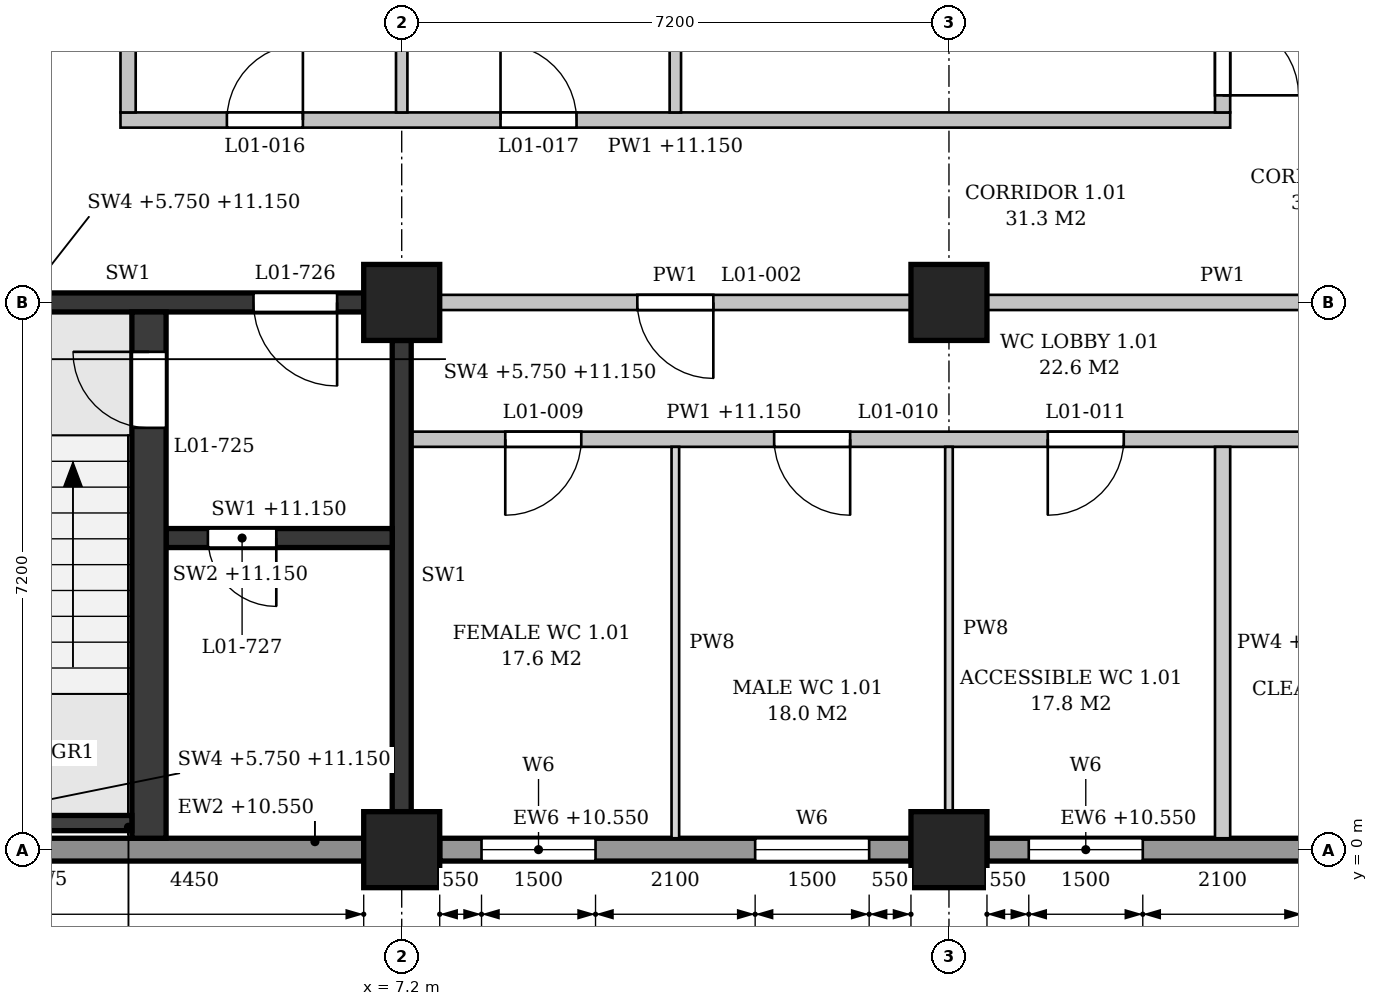
"""IFC4 building model, lengths in metres.
Left out: names, types, materials, properties, quantities, classifications, styles, units other than length and angle.
Written with IfcOpenShell. Run it as: python <this file> out.ifc"""

import sys

from ifc_helpers import new_model, si_unit, direction, frame, frame_2d, origin, origin_2d, place, context, subcontext, project, spatial, polyline, rectangle, outline, extrude, element, fill, save


model = new_model("IFC4")
c1 = context("Model", 3, precision=1e-05, world=origin(), true_north=direction((0.0, 1.0)))
c2 = subcontext(c1, "Body", "Model", "MODEL_VIEW")
j1 = project(units=[si_unit("LENGTHUNIT", "METRE"), si_unit("PLANEANGLEUNIT", "RADIAN")], contexts=[c1])
p1 = place(None, origin())
s1 = spatial("IfcSite", under=j1, at=p1, CompositionType="ELEMENT")
p2 = place(p1, origin())
s2 = spatial("IfcBuilding", under=s1, at=p2, CompositionType="ELEMENT")
p3 = place(p2, frame((0.0, 0.0, 6.0)))
s3 = spatial("IfcBuildingStorey", under=s2, at=p3, CompositionType="ELEMENT", Elevation=6.0)
for number, where, z_axis, x_axis in (
    (1, (7.2, 0.0, 0.0), (0.0, 0.0, 1.0), (1.0, 0.0, 0.0)),
    (2, (7.2, 7.2, 0.0), (0.0, 0.0, 1.0), (1.0, 0.0, 0.0)),
    (3, (14.4, 0.0, 0.0), (0.0, 0.0, 1.0), (1.0, 0.0, 0.0)),
    (4, (14.4, 7.2, 0.0), (0.0, 0.0, 1.0), (1.0, 0.0, 0.0)),
):
    element("IfcColumn", number, at=place(p3, frame(where, z_axis=z_axis, x_axis=x_axis)), inside=s3, PredefinedType="COLUMN", context=c2, shape_type="SweptSolid", body=[
        extrude(rectangle(XDim=1.0, YDim=1.0, at=origin_2d()), origin(), (0.0, 0.0, 1.0), 5.4),
    ])
p4 = place(p3, frame((0.5, 0.0, 0.0), z_axis=(0.0, 0.0, 1.0), x_axis=(1.0, 0.0, 0.0)))
e5 = element("IfcWall", 5, at=p4, inside=s3, PredefinedType="STANDARD", context=c2, shape_type="SweptSolid", body=[
    extrude(rectangle(XDim=6.2, YDim=0.3, at=frame_2d((3.1, 0.0))), origin(), (0.0, 0.0, 1.0), 4.55),
])
p5 = place(p4, frame((0.85, 0.0, 0.9)))
e6 = element("IfcOpeningElement", 6, at=p5, cuts=e5, PredefinedType="OPENING", context=c2, shape_type="SweptSolid", body=[
    extrude(outline(polyline([(0.0, 0.0), (0.9, 0.0), (0.9, 3.15), (0.45, 3.6), (0.0, 3.15), (0.0, 0.0)])), frame((0.0, 0.16, 0.0), z_axis=(0.0, -1.0, 0.0), x_axis=(1.0, 0.0, 0.0)), (0.0, 0.0, 1.0), 0.32),
])
p6 = place(p3, frame((7.7, 0.0, 0.0), z_axis=(0.0, 0.0, 1.0), x_axis=(1.0, 0.0, 0.0)))
e7 = element("IfcWall", 7, at=p6, inside=s3, PredefinedType="STANDARD", context=c2, shape_type="SweptSolid", body=[
    extrude(rectangle(XDim=6.2, YDim=0.3, at=frame_2d((3.1, 0.0))), origin(), (0.0, 0.0, 1.0), 4.55),
])
p7 = place(p6, frame((0.55, 0.0, 0.9)))
e8 = element("IfcOpeningElement", 8, at=p7, cuts=e7, PredefinedType="OPENING", context=c2, shape_type="SweptSolid", body=[
    extrude(outline(polyline([(0.0, 0.0), (1.5, 0.0), (1.5, 2.85), (0.75, 3.6), (0.0, 2.85), (0.0, 0.0)])), frame((0.0, 0.16, 0.0), z_axis=(0.0, -1.0, 0.0), x_axis=(1.0, 0.0, 0.0)), (0.0, 0.0, 1.0), 0.32),
])
p8 = place(p6, frame((4.15, 0.0, 0.9)))
e9 = element("IfcOpeningElement", 9, at=p8, cuts=e7, PredefinedType="OPENING", context=c2, shape_type="SweptSolid", body=[
    extrude(outline(polyline([(0.0, 0.0), (1.5, 0.0), (1.5, 2.85), (0.75, 3.6), (0.0, 2.85), (0.0, 0.0)])), frame((0.0, 0.16, 0.0), z_axis=(0.0, -1.0, 0.0), x_axis=(1.0, 0.0, 0.0)), (0.0, 0.0, 1.0), 0.32),
])
p9 = place(p3, frame((14.9, 0.0, 0.0), z_axis=(0.0, 0.0, 1.0), x_axis=(1.0, 0.0, 0.0)))
e10 = element("IfcWall", 10, at=p9, inside=s3, PredefinedType="STANDARD", context=c2, shape_type="SweptSolid", body=[
    extrude(rectangle(XDim=6.2, YDim=0.3, at=frame_2d((3.1, 0.0))), origin(), (0.0, 0.0, 1.0), 4.55),
])
p10 = place(p9, frame((0.55, 0.0, 0.9)))
e11 = element("IfcOpeningElement", 11, at=p10, cuts=e10, PredefinedType="OPENING", context=c2, shape_type="SweptSolid", body=[
    extrude(outline(polyline([(0.0, 0.0), (1.5, 0.0), (1.5, 2.85), (0.75, 3.6), (0.0, 2.85), (0.0, 0.0)])), frame((0.0, 0.16, 0.0), z_axis=(0.0, -1.0, 0.0), x_axis=(1.0, 0.0, 0.0)), (0.0, 0.0, 1.0), 0.32),
])
p11 = place(p9, frame((4.15, 0.0, 0.9)))
e12 = element("IfcOpeningElement", 12, at=p11, cuts=e10, PredefinedType="OPENING", context=c2, shape_type="SweptSolid", body=[
    extrude(outline(polyline([(0.0, 0.0), (1.5, 0.0), (1.5, 2.85), (0.75, 3.6), (0.0, 2.85), (0.0, 0.0)])), frame((0.0, 0.16, 0.0), z_axis=(0.0, -1.0, 0.0), x_axis=(1.0, 0.0, 0.0)), (0.0, 0.0, 1.0), 0.32),
])
p12 = place(p3, frame((0.5, 7.2, 0.0), z_axis=(0.0, 0.0, 1.0), x_axis=(1.0, 0.0, 0.0)))
e13 = element("IfcWall", 13, at=p12, inside=s3, PredefinedType="SHEAR", context=c2, shape_type="SweptSolid", body=[
    extrude(rectangle(XDim=6.2, YDim=0.25, at=frame_2d((3.1, 0.0))), origin(), (0.0, 0.0, 1.0), 4.4),
])
p13 = place(p12, frame((4.75, 0.0, 0.0)))
e14 = element("IfcOpeningElement", 14, at=p13, cuts=e13, PredefinedType="OPENING", context=c2, shape_type="SweptSolid", body=[
    extrude(rectangle(XDim=1.1, YDim=2.1, at=frame_2d((0.55, 1.05))), frame((0.0, 0.135, 0.0), z_axis=(0.0, -1.0, 0.0), x_axis=(1.0, 0.0, 0.0)), (0.0, 0.0, 1.0), 0.27),
])
p14 = place(p3, frame((7.2, 0.5, 0.0), z_axis=(0.0, 0.0, 1.0), x_axis=(0.0, 1.0, 0.0)))
e15 = element("IfcWall", 15, at=p14, inside=s3, PredefinedType="SHEAR", context=c2, shape_type="SweptSolid", body=[
    extrude(rectangle(XDim=6.2, YDim=0.25, at=frame_2d((3.1, 0.0))), origin(), (0.0, 0.0, 1.0), 4.4),
])
p15 = place(p3, frame((2.25, 0.35, -0.25), z_axis=(0.0, 0.0, 1.0), x_axis=(1.0, 0.0, 0.0)))
e16 = element("IfcWall", 16, at=p15, inside=s3, PredefinedType="SHEAR", context=c2, shape_type="SweptSolid", body=[
    extrude(rectangle(XDim=1.4, YDim=0.2, at=frame_2d((0.7, 0.0))), origin(), (0.0, 0.0, 1.0), 5.4),
])
p16 = place(p3, frame((3.875, 0.15, 0.0), z_axis=(0.0, 0.0, 1.0), x_axis=(0.0, 1.0, 0.0)))
e17 = element("IfcWall", 17, at=p16, inside=s3, PredefinedType="SHEAR", context=c2, shape_type="SweptSolid", body=[
    extrude(rectangle(XDim=6.925, YDim=0.45, at=frame_2d((3.462, 0.0))), origin(), (0.0, 0.0, 1.0), 5.15),
])
p17 = place(p16, frame((5.4, 0.0, 0.0)))
e18 = element("IfcOpeningElement", 18, at=p17, cuts=e17, PredefinedType="OPENING", context=c2, shape_type="SweptSolid", body=[
    extrude(rectangle(XDim=1.0, YDim=2.1, at=frame_2d((0.5, 1.05))), frame((0.0, 0.235, 0.0), z_axis=(0.0, -1.0, 0.0), x_axis=(1.0, 0.0, 0.0)), (0.0, 0.0, 1.0), 0.47),
])
p18 = place(p3, frame((4.1, 4.1, 0.0), z_axis=(0.0, 0.0, 1.0), x_axis=(1.0, 0.0, 0.0)))
e19 = element("IfcWall", 19, at=p18, inside=s3, PredefinedType="SHEAR", context=c2, shape_type="SweptSolid", body=[
    extrude(rectangle(XDim=2.975, YDim=0.25, at=frame_2d((1.487, 0.0))), origin(), (0.0, 0.0, 1.0), 5.15),
])
p19 = place(p18, frame((0.55, 0.0, 0.0)))
e20 = element("IfcOpeningElement", 20, at=p19, cuts=e19, PredefinedType="OPENING", context=c2, shape_type="SweptSolid", body=[
    extrude(rectangle(XDim=0.9, YDim=2.1, at=frame_2d((0.45, 1.05))), frame((0.0, 0.135, 0.0), z_axis=(0.0, -1.0, 0.0), x_axis=(1.0, 0.0, 0.0)), (0.0, 0.0, 1.0), 0.27),
])
p20 = place(p3, frame((7.325, 5.4, 0.0), z_axis=(0.0, 0.0, 1.0), x_axis=(1.0, 0.0, 0.0)))
e21 = element("IfcWall", 21, at=p20, inside=s3, PredefinedType="PARTITIONING", context=c2, shape_type="SweptSolid", body=[
    extrude(outline(polyline([(0.0, 0.0), (14.15, 0.0), (14.15, 4.4), (14.025, 4.4), (14.025, 5.15), (7.325, 5.15), (7.325, 4.4), (6.825, 4.4), (6.825, 5.15), (0.125, 5.15), (0.125, 4.4), (0.0, 4.4), (0.0, 0.0)])), frame((0.0, 0.1, 0.0), z_axis=(0.0, -1.0, 0.0), x_axis=(1.0, 0.0, 0.0)), (0.0, 0.0, 1.0), 0.2),
])
p21 = place(p20, frame((1.238, 0.0, 0.0)))
e22 = element("IfcOpeningElement", 22, at=p21, cuts=e21, PredefinedType="OPENING", context=c2, shape_type="SweptSolid", body=[
    extrude(rectangle(XDim=1.0, YDim=2.1, at=frame_2d((0.5, 1.05))), frame((0.0, 0.11, 0.0), z_axis=(0.0, -1.0, 0.0), x_axis=(1.0, 0.0, 0.0)), (0.0, 0.0, 1.0), 0.22),
])
p22 = place(p20, frame((4.775, 0.0, 0.0)))
e23 = element("IfcOpeningElement", 23, at=p22, cuts=e21, PredefinedType="OPENING", context=c2, shape_type="SweptSolid", body=[
    extrude(rectangle(XDim=1.0, YDim=2.1, at=frame_2d((0.5, 1.05))), frame((0.0, 0.11, 0.0), z_axis=(0.0, -1.0, 0.0), x_axis=(1.0, 0.0, 0.0)), (0.0, 0.0, 1.0), 0.22),
])
p23 = place(p20, frame((8.375, 0.0, 0.0)))
e24 = element("IfcOpeningElement", 24, at=p23, cuts=e21, PredefinedType="OPENING", context=c2, shape_type="SweptSolid", body=[
    extrude(rectangle(XDim=1.0, YDim=2.1, at=frame_2d((0.5, 1.05))), frame((0.0, 0.11, 0.0), z_axis=(0.0, -1.0, 0.0), x_axis=(1.0, 0.0, 0.0)), (0.0, 0.0, 1.0), 0.22),
])
p24 = place(p20, frame((11.913, 0.0, 0.0)))
e25 = element("IfcOpeningElement", 25, at=p24, cuts=e21, PredefinedType="OPENING", context=c2, shape_type="SweptSolid", body=[
    extrude(rectangle(XDim=1.0, YDim=2.1, at=frame_2d((0.5, 1.05))), frame((0.0, 0.11, 0.0), z_axis=(0.0, -1.0, 0.0), x_axis=(1.0, 0.0, 0.0)), (0.0, 0.0, 1.0), 0.22),
])
p25 = place(p3, frame((7.7, 7.2, 0.0), z_axis=(0.0, 0.0, 1.0), x_axis=(1.0, 0.0, 0.0)))
e26 = element("IfcWall", 26, at=p25, inside=s3, PredefinedType="PARTITIONING", context=c2, shape_type="SweptSolid", body=[
    extrude(rectangle(XDim=6.2, YDim=0.2, at=frame_2d((3.1, 0.0))), origin(), (0.0, 0.0, 1.0), 4.4),
])
p26 = place(p25, frame((2.6, 0.0, 0.0)))
e27 = element("IfcOpeningElement", 27, at=p26, cuts=e26, PredefinedType="OPENING", context=c2, shape_type="SweptSolid", body=[
    extrude(rectangle(XDim=1.0, YDim=2.1, at=frame_2d((0.5, 1.05))), frame((0.0, 0.11, 0.0), z_axis=(0.0, -1.0, 0.0), x_axis=(1.0, 0.0, 0.0)), (0.0, 0.0, 1.0), 0.22),
])
p27 = place(p3, frame((14.9, 7.2, 0.0), z_axis=(0.0, 0.0, 1.0), x_axis=(1.0, 0.0, 0.0)))
e28 = element("IfcWall", 28, at=p27, inside=s3, PredefinedType="PARTITIONING", context=c2, shape_type="SweptSolid", body=[
    extrude(rectangle(XDim=6.2, YDim=0.2, at=frame_2d((3.1, 0.0))), origin(), (0.0, 0.0, 1.0), 4.4),
])
p28 = place(p27, frame((4.15, 0.0, 0.0)))
e29 = element("IfcOpeningElement", 29, at=p28, cuts=e28, PredefinedType="OPENING", context=c2, shape_type="SweptSolid", body=[
    extrude(rectangle(XDim=1.0, YDim=2.1, at=frame_2d((0.5, 1.05))), frame((0.0, 0.11, 0.0), z_axis=(0.0, -1.0, 0.0), x_axis=(1.0, 0.0, 0.0)), (0.0, 0.0, 1.0), 0.22),
])
p29 = place(p3, frame((3.5, 9.6, 0.0), z_axis=(0.0, 0.0, 1.0), x_axis=(1.0, 0.0, 0.0)))
e30 = element("IfcWall", 30, at=p29, inside=s3, PredefinedType="PARTITIONING", context=c2, shape_type="SweptSolid", body=[
    extrude(outline(polyline([(0.0, 0.0), (14.6, 0.0), (14.6, 5.15), (11.15, 5.15), (11.15, 4.4), (10.65, 4.4), (10.65, 5.15), (3.95, 5.15), (3.95, 4.4), (3.45, 4.4), (3.45, 5.15), (0.0, 5.15), (0.0, 0.0)])), frame((0.0, 0.1, 0.0), z_axis=(0.0, -1.0, 0.0), x_axis=(1.0, 0.0, 0.0)), (0.0, 0.0, 1.0), 0.2),
])
p30 = place(p29, frame((1.4, 0.0, 0.0)))
e31 = element("IfcOpeningElement", 31, at=p30, cuts=e30, PredefinedType="OPENING", context=c2, shape_type="SweptSolid", body=[
    extrude(rectangle(XDim=1.0, YDim=2.1, at=frame_2d((0.5, 1.05))), frame((0.0, 0.11, 0.0), z_axis=(0.0, -1.0, 0.0), x_axis=(1.0, 0.0, 0.0)), (0.0, 0.0, 1.0), 0.22),
])
p31 = place(p29, frame((5.0, 0.0, 0.0)))
e32 = element("IfcOpeningElement", 32, at=p31, cuts=e30, PredefinedType="OPENING", context=c2, shape_type="SweptSolid", body=[
    extrude(rectangle(XDim=1.0, YDim=2.1, at=frame_2d((0.5, 1.05))), frame((0.0, 0.11, 0.0), z_axis=(0.0, -1.0, 0.0), x_axis=(1.0, 0.0, 0.0)), (0.0, 0.0, 1.0), 0.22),
])
p32 = place(p3, frame((3.6, 9.7, 0.0), z_axis=(0.0, 0.0, 1.0), x_axis=(0.0, 1.0, 0.0)))
e33 = element("IfcWall", 33, at=p32, inside=s3, PredefinedType="PARTITIONING", context=c2, shape_type="SweptSolid", body=[
    extrude(rectangle(XDim=1.1, YDim=0.2, at=frame_2d((0.55, 0.0))), origin(), (0.0, 0.0, 1.0), 5.15),
])
p33 = place(p3, frame((7.2, 9.7, 0.0), z_axis=(0.0, 0.0, 1.0), x_axis=(0.0, 1.0, 0.0)))
e34 = element("IfcWall", 34, at=p33, inside=s3, PredefinedType="PARTITIONING", context=c2, shape_type="SweptSolid", body=[
    extrude(rectangle(XDim=4.2, YDim=0.15, at=frame_2d((2.1, 0.0))), origin(), (0.0, 0.0, 1.0), 4.4),
])
p34 = place(p3, frame((10.8, 0.15, 0.0), z_axis=(0.0, 0.0, 1.0), x_axis=(0.0, 1.0, 0.0)))
e35 = element("IfcWall", 35, at=p34, inside=s3, PredefinedType="PARTITIONING", context=c2, shape_type="SweptSolid", body=[
    extrude(rectangle(XDim=5.15, YDim=0.1, at=frame_2d((2.575, 0.0))), origin(), (0.0, 0.0, 1.0), 4.4),
])
p35 = place(p3, frame((10.8, 9.7, 0.0), z_axis=(0.0, 0.0, 1.0), x_axis=(0.0, 1.0, 0.0)))
e36 = element("IfcWall", 36, at=p35, inside=s3, PredefinedType="PARTITIONING", context=c2, shape_type="SweptSolid", body=[
    extrude(rectangle(XDim=11.75, YDim=0.15, at=frame_2d((5.875, 0.0))), origin(), (0.0, 0.0, 1.0), 4.4),
])
p36 = place(p3, frame((14.4, 0.5, 0.0), z_axis=(0.0, 0.0, 1.0), x_axis=(0.0, 1.0, 0.0)))
e37 = element("IfcWall", 37, at=p36, inside=s3, PredefinedType="PARTITIONING", context=c2, shape_type="SweptSolid", body=[
    extrude(rectangle(XDim=4.8, YDim=0.1, at=frame_2d((2.4, 0.0))), origin(), (0.0, 0.0, 1.0), 4.4),
])
p37 = place(p3, frame((18.0, 0.15, 0.0), z_axis=(0.0, 0.0, 1.0), x_axis=(0.0, 1.0, 0.0)))
e38 = element("IfcWall", 38, at=p37, inside=s3, PredefinedType="PARTITIONING", context=c2, shape_type="SweptSolid", body=[
    extrude(outline(polyline([(0.0, 0.0), (5.15, 0.0), (5.15, 5.15), (0.1, 5.15), (0.1, 4.55), (0.0, 4.55), (0.0, 0.0)])), frame((0.0, 0.1, 0.0), z_axis=(0.0, -1.0, 0.0), x_axis=(1.0, 0.0, 0.0)), (0.0, 0.0, 1.0), 0.2),
])
p38 = place(p3, frame((18.0, 9.7, 0.0), z_axis=(0.0, 0.0, 1.0), x_axis=(0.0, 1.0, 0.0)))
e39 = element("IfcWall", 39, at=p38, inside=s3, PredefinedType="PARTITIONING", context=c2, shape_type="SweptSolid", body=[
    extrude(outline(polyline([(0.0, 0.0), (7.1, 0.0), (7.1, 5.15), (4.95, 5.15), (4.95, 4.4), (4.45, 4.4), (4.45, 5.15), (0.0, 5.15), (0.0, 0.0)])), frame((0.0, 0.1, 0.0), z_axis=(0.0, -1.0, 0.0), x_axis=(1.0, 0.0, 0.0)), (0.0, 0.0, 1.0), 0.2),
])
p39 = place(p38, frame((2.55, 0.0, 0.0)))
e40 = element("IfcOpeningElement", 40, at=p39, cuts=e39, PredefinedType="OPENING", context=c2, shape_type="SweptSolid", body=[
    extrude(rectangle(XDim=2.0, YDim=2.1, at=frame_2d((1.0, 1.05))), frame((0.0, 0.11, 0.0), z_axis=(0.0, -1.0, 0.0), x_axis=(1.0, 0.0, 0.0)), (0.0, 0.0, 1.0), 0.22),
])
p40 = place(p38, frame((0.225, 0.0, 0.0)))
e41 = element("IfcOpeningElement", 41, at=p40, cuts=e39, PredefinedType="OPENING", context=c2, shape_type="SweptSolid", body=[
    extrude(rectangle(XDim=2.0, YDim=2.1, at=frame_2d((1.0, 1.05))), frame((0.0, 0.11, 0.0), z_axis=(0.0, -1.0, 0.0), x_axis=(1.0, 0.0, 0.0)), (0.0, 0.0, 1.0), 0.22),
])
p41 = place(p7, origin())
e42 = element("IfcWindow", 42, at=p41, inside=s3, PartitioningType="SINGLE_PANEL", PredefinedType="WINDOW", context=c2, shape_type="SweptSolid", body=[
    extrude(outline(polyline([(0.0, 0.0), (1.5, 0.0), (1.5, 2.85), (0.75, 3.6), (0.0, 2.85), (0.0, 0.0)])), frame((0.0, 0.03, 0.0), z_axis=(0.0, -1.0, 0.0), x_axis=(1.0, 0.0, 0.0)), (0.0, 0.0, 1.0), 0.06),
])
fill(e8, e42)
p42 = place(p8, origin())
e43 = element("IfcWindow", 43, at=p42, inside=s3, PartitioningType="SINGLE_PANEL", PredefinedType="WINDOW", context=c2, shape_type="SweptSolid", body=[
    extrude(outline(polyline([(0.0, 0.0), (1.5, 0.0), (1.5, 2.85), (0.75, 3.6), (0.0, 2.85), (0.0, 0.0)])), frame((0.0, 0.03, 0.0), z_axis=(0.0, -1.0, 0.0), x_axis=(1.0, 0.0, 0.0)), (0.0, 0.0, 1.0), 0.06),
])
fill(e9, e43)
p43 = place(p10, origin())
e44 = element("IfcWindow", 44, at=p43, inside=s3, PartitioningType="SINGLE_PANEL", PredefinedType="WINDOW", context=c2, shape_type="SweptSolid", body=[
    extrude(outline(polyline([(0.0, 0.0), (1.5, 0.0), (1.5, 2.85), (0.75, 3.6), (0.0, 2.85), (0.0, 0.0)])), frame((0.0, 0.03, 0.0), z_axis=(0.0, -1.0, 0.0), x_axis=(1.0, 0.0, 0.0)), (0.0, 0.0, 1.0), 0.06),
])
fill(e11, e44)
p44 = place(p17, origin())
e45 = element("IfcDoor", 45, at=p44, inside=s3, OperationType="SINGLE_SWING_RIGHT", PredefinedType="DOOR", context=c2, shape_type="SweptSolid", body=[
    extrude(rectangle(XDim=1.0, YDim=2.1, at=frame_2d((0.5, 1.05))), frame((0.0, 0.025, 0.0), z_axis=(0.0, -1.0, 0.0), x_axis=(1.0, 0.0, 0.0)), (0.0, 0.0, 1.0), 0.05),
])
fill(e18, e45)
p45 = place(p13, frame((1.1, 0.0, 0.0), z_axis=(0.0, 0.0, 1.0), x_axis=(-1.0, 0.0, 0.0)))
e46 = element("IfcDoor", 46, at=p45, inside=s3, OperationType="SINGLE_SWING_LEFT", PredefinedType="DOOR", context=c2, shape_type="SweptSolid", body=[
    extrude(rectangle(XDim=1.1, YDim=2.1, at=frame_2d((0.55, 1.05))), frame((0.0, 0.025, 0.0), z_axis=(0.0, -1.0, 0.0), x_axis=(1.0, 0.0, 0.0)), (0.0, 0.0, 1.0), 0.05),
])
fill(e14, e46)
p46 = place(p19, frame((0.9, 0.0, 0.0), z_axis=(0.0, 0.0, 1.0), x_axis=(-1.0, 0.0, 0.0)))
e47 = element("IfcDoor", 47, at=p46, inside=s3, OperationType="SINGLE_SWING_LEFT", PredefinedType="DOOR", context=c2, shape_type="SweptSolid", body=[
    extrude(rectangle(XDim=0.9, YDim=2.1, at=frame_2d((0.45, 1.05))), frame((0.0, 0.025, 0.0), z_axis=(0.0, -1.0, 0.0), x_axis=(1.0, 0.0, 0.0)), (0.0, 0.0, 1.0), 0.05),
])
fill(e20, e47)
p47 = place(p26, frame((1.0, 0.0, 0.0), z_axis=(0.0, 0.0, 1.0), x_axis=(-1.0, 0.0, 0.0)))
e48 = element("IfcDoor", 48, at=p47, inside=s3, OperationType="SINGLE_SWING_LEFT", PredefinedType="DOOR", context=c2, shape_type="SweptSolid", body=[
    extrude(rectangle(XDim=1.0, YDim=2.1, at=frame_2d((0.5, 1.05))), frame((0.0, 0.025, 0.0), z_axis=(0.0, -1.0, 0.0), x_axis=(1.0, 0.0, 0.0)), (0.0, 0.0, 1.0), 0.05),
])
fill(e27, e48)
p48 = place(p21, frame((1.0, 0.0, 0.0), z_axis=(0.0, 0.0, 1.0), x_axis=(-1.0, 0.0, 0.0)))
e49 = element("IfcDoor", 49, at=p48, inside=s3, OperationType="SINGLE_SWING_RIGHT", PredefinedType="DOOR", context=c2, shape_type="SweptSolid", body=[
    extrude(rectangle(XDim=1.0, YDim=2.1, at=frame_2d((0.5, 1.05))), frame((0.0, 0.025, 0.0), z_axis=(0.0, -1.0, 0.0), x_axis=(1.0, 0.0, 0.0)), (0.0, 0.0, 1.0), 0.05),
])
fill(e22, e49)
p49 = place(p22, frame((1.0, 0.0, 0.0), z_axis=(0.0, 0.0, 1.0), x_axis=(-1.0, 0.0, 0.0)))
e50 = element("IfcDoor", 50, at=p49, inside=s3, OperationType="SINGLE_SWING_LEFT", PredefinedType="DOOR", context=c2, shape_type="SweptSolid", body=[
    extrude(rectangle(XDim=1.0, YDim=2.1, at=frame_2d((0.5, 1.05))), frame((0.0, 0.025, 0.0), z_axis=(0.0, -1.0, 0.0), x_axis=(1.0, 0.0, 0.0)), (0.0, 0.0, 1.0), 0.05),
])
fill(e23, e50)
p50 = place(p23, frame((1.0, 0.0, 0.0), z_axis=(0.0, 0.0, 1.0), x_axis=(-1.0, 0.0, 0.0)))
e51 = element("IfcDoor", 51, at=p50, inside=s3, OperationType="SINGLE_SWING_RIGHT", PredefinedType="DOOR", context=c2, shape_type="SweptSolid", body=[
    extrude(rectangle(XDim=1.0, YDim=2.1, at=frame_2d((0.5, 1.05))), frame((0.0, 0.025, 0.0), z_axis=(0.0, -1.0, 0.0), x_axis=(1.0, 0.0, 0.0)), (0.0, 0.0, 1.0), 0.05),
])
fill(e24, e51)
p51 = place(p30, origin())
e52 = element("IfcDoor", 52, at=p51, inside=s3, OperationType="SINGLE_SWING_RIGHT", PredefinedType="DOOR", context=c2, shape_type="SweptSolid", body=[
    extrude(rectangle(XDim=1.0, YDim=2.1, at=frame_2d((0.5, 1.05))), frame((0.0, 0.025, 0.0), z_axis=(0.0, -1.0, 0.0), x_axis=(1.0, 0.0, 0.0)), (0.0, 0.0, 1.0), 0.05),
])
fill(e31, e52)
p52 = place(p31, origin())
e53 = element("IfcDoor", 53, at=p52, inside=s3, OperationType="SINGLE_SWING_LEFT", PredefinedType="DOOR", context=c2, shape_type="SweptSolid", body=[
    extrude(rectangle(XDim=1.0, YDim=2.1, at=frame_2d((0.5, 1.05))), frame((0.0, 0.025, 0.0), z_axis=(0.0, -1.0, 0.0), x_axis=(1.0, 0.0, 0.0)), (0.0, 0.0, 1.0), 0.05),
])
fill(e32, e53)
p53 = place(p40, origin())
e54 = element("IfcDoor", 54, at=p53, inside=s3, OperationType="DOUBLE_DOOR_SINGLE_SWING", PredefinedType="DOOR", context=c2, shape_type="SweptSolid", body=[
    extrude(rectangle(XDim=2.0, YDim=2.1, at=frame_2d((1.0, 1.05))), frame((0.0, 0.025, 0.0), z_axis=(0.0, -1.0, 0.0), x_axis=(1.0, 0.0, 0.0)), (0.0, 0.0, 1.0), 0.05),
])
fill(e41, e54)
save(model, sys.argv[1])
